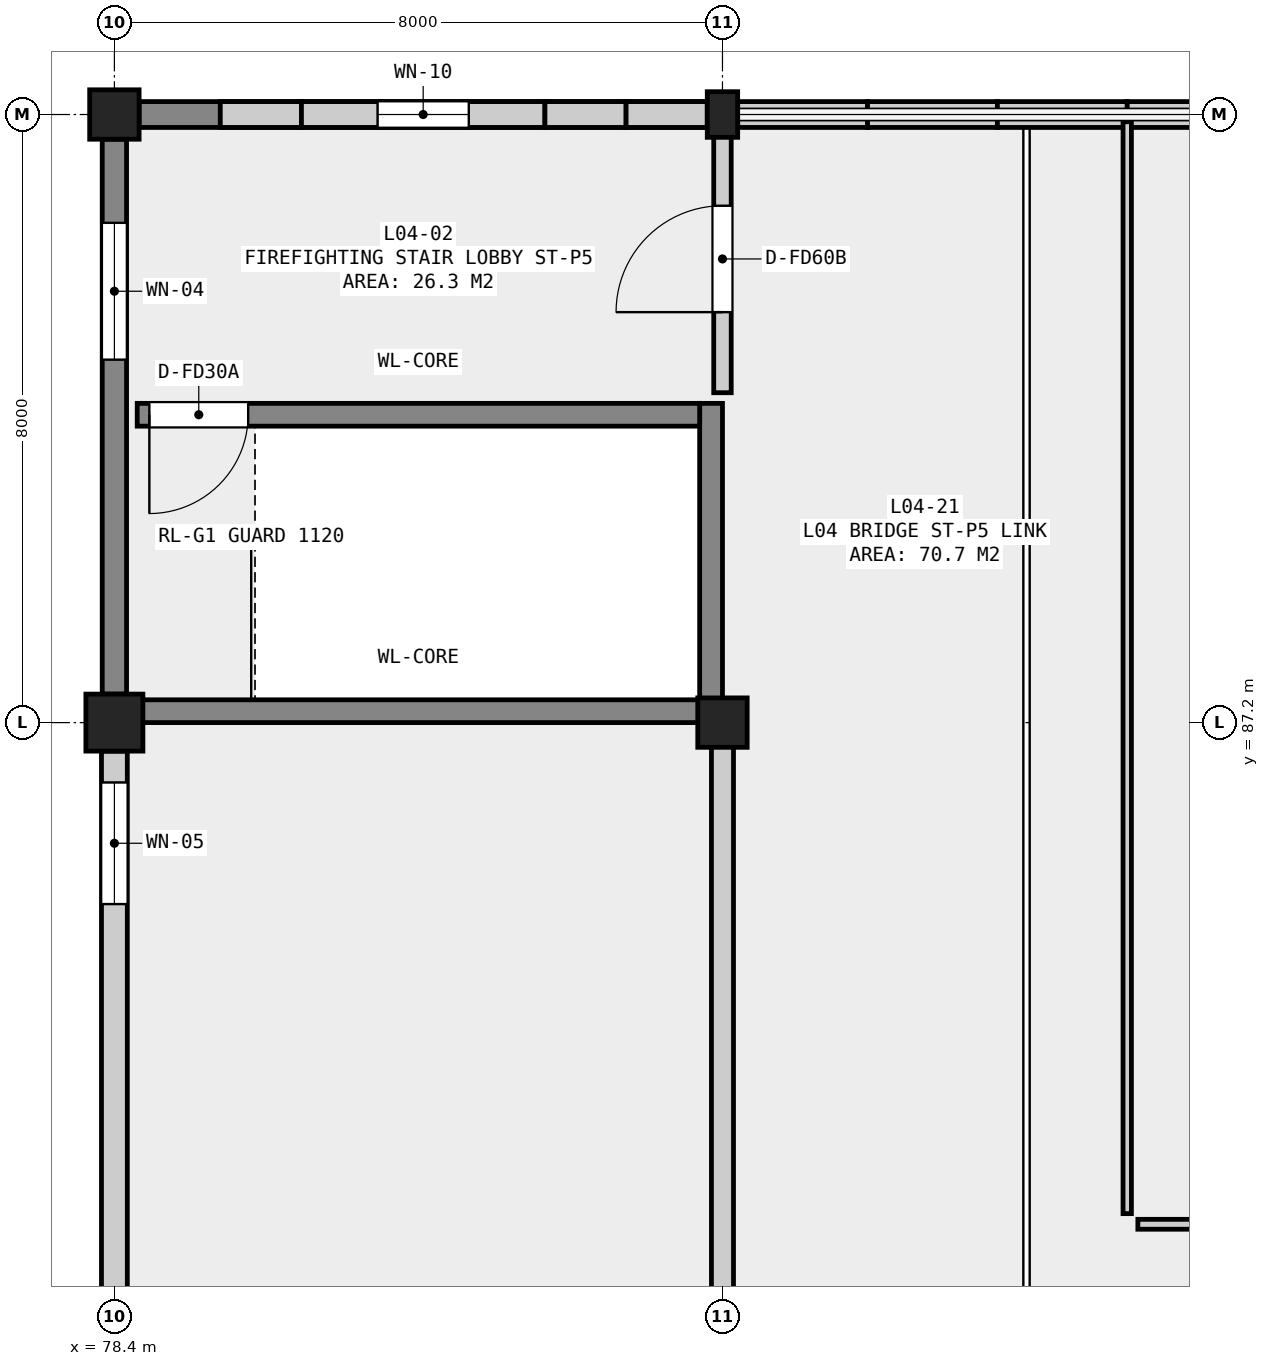
"""IFC4 building model, lengths in metres.
Left out: names, types, materials, properties, quantities, classifications, styles, units other than length and angle.
Written with IfcOpenShell. Run it as: python <this file> out.ifc"""

import sys

from ifc_helpers import new_model, si_unit, direction, frame, frame_2d, origin, origin_2d, place, context, subcontext, project, spatial, rectangle, extrude, element, fill, save


model = new_model("IFC4")
c1 = context("Model", 3, precision=1e-05, world=origin(), true_north=direction((0.0, 1.0)))
c2 = subcontext(c1, "Body", "Model", "MODEL_VIEW")
j1 = project(units=[si_unit("LENGTHUNIT", "METRE"), si_unit("PLANEANGLEUNIT", "RADIAN")], contexts=[c1])
p1 = place(None, origin())
s1 = spatial("IfcSite", under=j1, at=p1, CompositionType="ELEMENT")
p2 = place(p1, origin())
s2 = spatial("IfcBuilding", under=s1, at=p2, CompositionType="ELEMENT")
p3 = place(p2, frame((0.0, 0.0, 19.8)))
s3 = spatial("IfcBuildingStorey", under=s2, at=p3, CompositionType="ELEMENT", Elevation=19.8)
p4 = place(p3, frame((78.4, 87.2, 0.0), z_axis=(0.0, 0.0, 1.0), x_axis=(1.0, 0.0, 0.0)))
e1 = element("IfcColumn", 1, at=p4, inside=s3, PredefinedType="COLUMN", context=c2, shape_type="SweptSolid", body=[
    extrude(rectangle(XDim=0.75, YDim=0.75, at=origin_2d()), origin(), (0.0, 0.0, 1.0), 4.0),
])
for number, where, z_axis, x_axis in (
    (2, (78.4, 95.2, 0.0), (0.0, 0.0, 1.0), (1.0, 0.0, 0.0)),
    (3, (86.4, 87.2, 0.0), (0.0, 0.0, 1.0), (1.0, 0.0, 0.0)),
):
    element("IfcColumn", number, at=place(p3, frame(where, z_axis=z_axis, x_axis=x_axis)), inside=s3, PredefinedType="COLUMN", context=c2, shape_type="SweptSolid", body=[
        extrude(rectangle(XDim=0.65, YDim=0.65, at=origin_2d()), origin(), (0.0, 0.0, 1.0), 4.0),
    ])
p5 = place(p3, frame((86.4, 95.2, 0.0), z_axis=(0.0, 0.0, 1.0), x_axis=(1.0, 0.0, 0.0)))
e4 = element("IfcColumn", 4, at=p5, inside=s3, PredefinedType="COLUMN", context=c2, shape_type="SweptSolid", body=[
    extrude(rectangle(XDim=0.4, YDim=0.6, at=origin_2d()), origin(), (0.0, 0.0, 1.0), 4.0),
])
p6 = place(p3, frame((86.2, 95.2, 0.0), z_axis=(0.0, 0.0, 1.0), x_axis=(-1.0, 0.0, 0.0)))
e5 = element("IfcWall", 5, at=p6, inside=s3, PredefinedType="SOLIDWALL", context=c2, shape_type="SweptSolid", body=[
    extrude(rectangle(XDim=7.475, YDim=0.34, at=frame_2d((3.737, 0.0))), origin(), (0.0, 0.0, 1.0), 3.15),
])
p7 = place(p6, frame((3.137, 0.0, 0.9)))
e6 = element("IfcOpeningElement", 6, at=p7, cuts=e5, PredefinedType="OPENING", context=c2, shape_type="SweptSolid", body=[
    extrude(rectangle(XDim=1.2, YDim=1.7, at=frame_2d((0.6, 0.85))), frame((0.0, 0.182, 0.0), z_axis=(0.0, -1.0, 0.0), x_axis=(1.0, 0.0, 0.0)), (0.0, 0.0, 1.0), 0.364),
])
p8 = place(p3, frame((78.4, 94.875, 0.0), z_axis=(0.0, 0.0, 1.0), x_axis=(0.0, -1.0, 0.0)))
e7 = element("IfcWall", 7, at=p8, inside=s3, PredefinedType="SOLIDWALL", context=c2, shape_type="SweptSolid", body=[
    extrude(rectangle(XDim=7.3, YDim=0.32, at=frame_2d((3.65, 0.0))), origin(), (0.0, 0.0, 1.0), 3.15),
])
p9 = place(p8, frame((1.1, 0.0, 0.9)))
e8 = element("IfcOpeningElement", 8, at=p9, cuts=e7, PredefinedType="OPENING", context=c2, shape_type="SweptSolid", body=[
    extrude(rectangle(XDim=1.8, YDim=1.85, at=frame_2d((0.9, 0.925))), frame((0.0, 0.172, 0.0), z_axis=(0.0, -1.0, 0.0), x_axis=(1.0, 0.0, 0.0)), (0.0, 0.0, 1.0), 0.344),
])
p10 = place(p3, frame((78.4, 86.825, 0.0), z_axis=(0.0, 0.0, 1.0), x_axis=(0.0, -1.0, 0.0)))
e9 = element("IfcWall", 9, at=p10, inside=s3, PredefinedType="SOLIDWALL", context=c2, shape_type="SweptSolid", body=[
    extrude(rectangle(XDim=7.225, YDim=0.34, at=frame_2d((3.612, 0.0))), origin(), (0.0, 0.0, 1.0), 3.1),
])
p11 = place(p10, frame((0.413, 0.0, 0.9)))
e10 = element("IfcOpeningElement", 10, at=p11, cuts=e9, PredefinedType="OPENING", context=c2, shape_type="SweptSolid", body=[
    extrude(rectangle(XDim=1.6, YDim=1.95, at=frame_2d((0.8, 0.975))), frame((0.0, 0.182, 0.0), z_axis=(0.0, -1.0, 0.0), x_axis=(1.0, 0.0, 0.0)), (0.0, 0.0, 1.0), 0.364),
])
p12 = place(p3, frame((79.793, 95.2, 4.0), z_axis=(0.0, 0.0, 1.0), x_axis=(1.0, 0.0, 0.0)))
e11 = element("IfcWall", 11, at=p12, inside=s3, PredefinedType="SOLIDWALL", context=c2, shape_type="SweptSolid", body=[
    extrude(rectangle(XDim=1.068, YDim=0.34, at=frame_2d((0.534, 0.0))), origin(), (0.0, 0.0, 1.0), 0.347),
])
p13 = place(p3, frame((80.861, 95.2, 4.0), z_axis=(0.0, 0.0, 1.0), x_axis=(1.0, 0.0, 0.0)))
e12 = element("IfcWall", 12, at=p13, inside=s3, PredefinedType="SOLIDWALL", context=c2, shape_type="SweptSolid", body=[
    extrude(rectangle(XDim=1.068, YDim=0.34, at=frame_2d((0.534, 0.0))), origin(), (0.0, 0.0, 1.0), 0.614),
])
p14 = place(p3, frame((81.929, 95.2, 4.0), z_axis=(0.0, 0.0, 1.0), x_axis=(1.0, 0.0, 0.0)))
e13 = element("IfcWall", 13, at=p14, inside=s3, PredefinedType="SOLIDWALL", context=c2, shape_type="SweptSolid", body=[
    extrude(rectangle(XDim=1.068, YDim=0.34, at=frame_2d((0.534, 0.0))), origin(), (0.0, 0.0, 1.0), 0.88),
])
p15 = place(p3, frame((82.996, 95.2, 4.0), z_axis=(0.0, 0.0, 1.0), x_axis=(1.0, 0.0, 0.0)))
e14 = element("IfcWall", 14, at=p15, inside=s3, PredefinedType="SOLIDWALL", context=c2, shape_type="SweptSolid", body=[
    extrude(rectangle(XDim=1.068, YDim=0.34, at=frame_2d((0.534, 0.0))), origin(), (0.0, 0.0, 1.0), 1.146),
])
p16 = place(p3, frame((84.064, 95.2, 4.0), z_axis=(0.0, 0.0, 1.0), x_axis=(1.0, 0.0, 0.0)))
e15 = element("IfcWall", 15, at=p16, inside=s3, PredefinedType="SOLIDWALL", context=c2, shape_type="SweptSolid", body=[
    extrude(rectangle(XDim=1.068, YDim=0.34, at=frame_2d((0.534, 0.0))), origin(), (0.0, 0.0, 1.0), 1.412),
])
p17 = place(p3, frame((85.132, 95.2, 4.0), z_axis=(0.0, 0.0, 1.0), x_axis=(1.0, 0.0, 0.0)))
e16 = element("IfcWall", 16, at=p17, inside=s3, PredefinedType="SOLIDWALL", context=c2, shape_type="SweptSolid", body=[
    extrude(rectangle(XDim=1.068, YDim=0.34, at=frame_2d((0.534, 0.0))), origin(), (0.0, 0.0, 1.0), 1.678),
])
p18 = place(p3, frame((86.6, 95.2, 4.0), z_axis=(0.0, 0.0, 1.0), x_axis=(1.0, 0.0, 0.0)))
e17 = element("IfcWall", 17, at=p18, inside=s3, PredefinedType="SOLIDWALL", context=c2, shape_type="SweptSolid", body=[
    extrude(rectangle(XDim=1.708, YDim=0.34, at=frame_2d((0.854, 0.0))), origin(), (0.0, 0.0, 1.0), 2.044),
])
p19 = place(p3, frame((88.308, 95.2, 4.0), z_axis=(0.0, 0.0, 1.0), x_axis=(1.0, 0.0, 0.0)))
e18 = element("IfcWall", 18, at=p19, inside=s3, PredefinedType="SOLIDWALL", context=c2, shape_type="SweptSolid", body=[
    extrude(rectangle(XDim=1.708, YDim=0.34, at=frame_2d((0.854, 0.0))), origin(), (0.0, 0.0, 1.0), 2.47),
])
p20 = place(p3, frame((90.017, 95.2, 4.0), z_axis=(0.0, 0.0, 1.0), x_axis=(1.0, 0.0, 0.0)))
e19 = element("IfcWall", 19, at=p20, inside=s3, PredefinedType="SOLIDWALL", context=c2, shape_type="SweptSolid", body=[
    extrude(rectangle(XDim=1.708, YDim=0.34, at=frame_2d((0.854, 0.0))), origin(), (0.0, 0.0, 1.0), 2.662),
])
p21 = place(p3, frame((91.725, 95.2, 4.0), z_axis=(0.0, 0.0, 1.0), x_axis=(1.0, 0.0, 0.0)))
e20 = element("IfcWall", 20, at=p21, inside=s3, PredefinedType="SOLIDWALL", context=c2, shape_type="SweptSolid", body=[
    extrude(rectangle(XDim=1.708, YDim=0.34, at=frame_2d((0.854, 0.0))), origin(), (0.0, 0.0, 1.0), 2.236),
])
p22 = place(p3, frame((86.25, 87.2, 0.0), z_axis=(0.0, 0.0, 1.0), x_axis=(0.0, 1.0, 0.0)))
e21 = element("IfcWall", 21, at=p22, inside=s3, PredefinedType="SHEAR", context=c2, shape_type="SweptSolid", body=[
    extrude(rectangle(XDim=4.2, YDim=0.3, at=frame_2d((2.1, 0.0))), origin(), (0.0, 0.0, 1.0), 3.72),
])
p23 = place(p3, frame((78.7, 87.35, 0.0), z_axis=(0.0, 0.0, 1.0), x_axis=(1.0, 0.0, 0.0)))
e22 = element("IfcWall", 22, at=p23, inside=s3, PredefinedType="SHEAR", context=c2, shape_type="SweptSolid", body=[
    extrude(rectangle(XDim=7.4, YDim=0.3, at=frame_2d((3.7, 0.0))), origin(), (0.0, 0.0, 1.0), 3.72),
])
p24 = place(p3, frame((78.7, 91.25, 0.0), z_axis=(0.0, 0.0, 1.0), x_axis=(1.0, 0.0, 0.0)))
e23 = element("IfcWall", 23, at=p24, inside=s3, PredefinedType="SHEAR", context=c2, shape_type="SweptSolid", body=[
    extrude(rectangle(XDim=7.4, YDim=0.3, at=frame_2d((3.7, 0.0))), origin(), (0.0, 0.0, 1.0), 3.72),
])
p25 = place(p24, frame((0.16, 0.0, 0.0)))
e24 = element("IfcOpeningElement", 24, at=p25, cuts=e23, PredefinedType="OPENING", context=c2, shape_type="SweptSolid", body=[
    extrude(rectangle(XDim=1.3, YDim=2.18, at=frame_2d((0.65, 1.09))), frame((0.0, 0.162, 0.0), z_axis=(0.0, -1.0, 0.0), x_axis=(1.0, 0.0, 0.0)), (0.0, 0.0, 1.0), 0.324),
])
p26 = place(p3, frame((86.4, 91.54, 0.0), z_axis=(0.0, 0.0, 1.0), x_axis=(0.0, 1.0, 0.0)))
e25 = element("IfcWall", 25, at=p26, inside=s3, PredefinedType="SOLIDWALL", context=c2, shape_type="SweptSolid", body=[
    extrude(rectangle(XDim=3.475, YDim=0.23, at=frame_2d((1.737, 0.0))), origin(), (0.0, 0.0, 1.0), 3.72),
])
p27 = place(p26, frame((1.06, 0.0, 0.0)))
e26 = element("IfcOpeningElement", 26, at=p27, cuts=e25, PredefinedType="OPENING", context=c2, shape_type="SweptSolid", body=[
    extrude(rectangle(XDim=1.4, YDim=2.2, at=frame_2d((0.7, 1.1))), frame((0.0, 0.127, 0.0), z_axis=(0.0, -1.0, 0.0), x_axis=(1.0, 0.0, 0.0)), (0.0, 0.0, 1.0), 0.254),
])
p28 = place(p3, frame((86.4, 59.385, 0.0), z_axis=(0.0, 0.0, 1.0), x_axis=(0.0, 1.0, 0.0)))
e27 = element("IfcWall", 27, at=p28, inside=s3, PredefinedType="SOLIDWALL", context=c2, shape_type="SweptSolid", body=[
    extrude(rectangle(XDim=27.675, YDim=0.29, at=frame_2d((13.837, 0.0))), origin(), (0.0, 0.0, 1.0), 3.72),
])
p29 = place(p28, frame((13.515, 0.0, 0.0)))
e28 = element("IfcOpeningElement", 28, at=p29, cuts=e27, PredefinedType="OPENING", context=c2, shape_type="SweptSolid", body=[
    extrude(rectangle(XDim=1.4, YDim=2.2, at=frame_2d((0.7, 1.1))), frame((0.0, 0.157, 0.0), z_axis=(0.0, -1.0, 0.0), x_axis=(1.0, 0.0, 0.0)), (0.0, 0.0, 1.0), 0.314),
])
p30 = place(p3, frame((91.865, 80.6, 0.0), z_axis=(0.0, 0.0, 1.0), x_axis=(1.0, 0.0, 0.0)))
e29 = element("IfcWall", 29, at=p30, inside=s3, PredefinedType="PARTITIONING", context=c2, shape_type="SweptSolid", body=[
    extrude(rectangle(XDim=28.795, YDim=0.13, at=frame_2d((14.397, 0.0))), origin(), (0.0, 0.0, 1.0), 3.72),
])
p31 = place(p30, frame((14.01, 0.0, 0.0)))
e30 = element("IfcOpeningElement", 30, at=p31, cuts=e29, PredefinedType="OPENING", context=c2, shape_type="SweptSolid", body=[
    extrude(rectangle(XDim=1.05, YDim=2.15, at=frame_2d((0.525, 1.075))), frame((0.0, 0.077, 0.0), z_axis=(0.0, -1.0, 0.0), x_axis=(1.0, 0.0, 0.0)), (0.0, 0.0, 1.0), 0.154),
])
p32 = place(p3, frame((91.725, 80.74, 0.0), z_axis=(0.0, 0.0, 1.0), x_axis=(0.0, 1.0, 0.0)))
e31 = element("IfcWall", 31, at=p32, inside=s3, PredefinedType="PARTITIONING", context=c2, shape_type="SweptSolid", body=[
    extrude(rectangle(XDim=14.365, YDim=0.11, at=frame_2d((7.183, 0.0))), origin(), (0.0, 0.0, 1.0), 3.72),
])
p33 = place(p7, origin())
e32 = element("IfcWindow", 32, at=p33, inside=s3, PartitioningType="SINGLE_PANEL", PredefinedType="WINDOW", context=c2, shape_type="SweptSolid", body=[
    extrude(rectangle(XDim=1.2, YDim=1.7, at=frame_2d((0.6, 0.85))), frame((0.0, 0.03, 0.0), z_axis=(0.0, -1.0, 0.0), x_axis=(1.0, 0.0, 0.0)), (0.0, 0.0, 1.0), 0.06),
])
fill(e6, e32)
p34 = place(p9, origin())
e33 = element("IfcWindow", 33, at=p34, inside=s3, PartitioningType="DOUBLE_PANEL_VERTICAL", PredefinedType="WINDOW", context=c2, shape_type="SweptSolid", body=[
    extrude(rectangle(XDim=1.8, YDim=1.85, at=frame_2d((0.9, 0.925))), frame((0.0, 0.03, 0.0), z_axis=(0.0, -1.0, 0.0), x_axis=(1.0, 0.0, 0.0)), (0.0, 0.0, 1.0), 0.06),
])
fill(e8, e33)
p35 = place(p11, origin())
e34 = element("IfcWindow", 34, at=p35, inside=s3, PartitioningType="DOUBLE_PANEL_VERTICAL", PredefinedType="WINDOW", context=c2, shape_type="SweptSolid", body=[
    extrude(rectangle(XDim=1.6, YDim=1.95, at=frame_2d((0.8, 0.975))), frame((0.0, 0.03, 0.0), z_axis=(0.0, -1.0, 0.0), x_axis=(1.0, 0.0, 0.0)), (0.0, 0.0, 1.0), 0.06),
])
fill(e10, e34)
p36 = place(p25, frame((1.3, 0.0, 0.0), z_axis=(0.0, 0.0, 1.0), x_axis=(-1.0, 0.0, 0.0)))
e35 = element("IfcDoor", 35, at=p36, inside=s3, OperationType="SINGLE_SWING_RIGHT", PredefinedType="DOOR", context=c2, shape_type="SweptSolid", body=[
    extrude(rectangle(XDim=1.3, YDim=2.18, at=frame_2d((0.65, 1.09))), frame((0.0, 0.025, 0.0), z_axis=(0.0, -1.0, 0.0), x_axis=(1.0, 0.0, 0.0)), (0.0, 0.0, 1.0), 0.05),
])
fill(e24, e35)
p37 = place(p27, origin())
e36 = element("IfcDoor", 36, at=p37, inside=s3, OperationType="SINGLE_SWING_LEFT", PredefinedType="DOOR", context=c2, shape_type="SweptSolid", body=[
    extrude(rectangle(XDim=1.4, YDim=2.2, at=frame_2d((0.7, 1.1))), frame((0.0, 0.025, 0.0), z_axis=(0.0, -1.0, 0.0), x_axis=(1.0, 0.0, 0.0)), (0.0, 0.0, 1.0), 0.05),
])
fill(e26, e36)
save(model, sys.argv[1])
